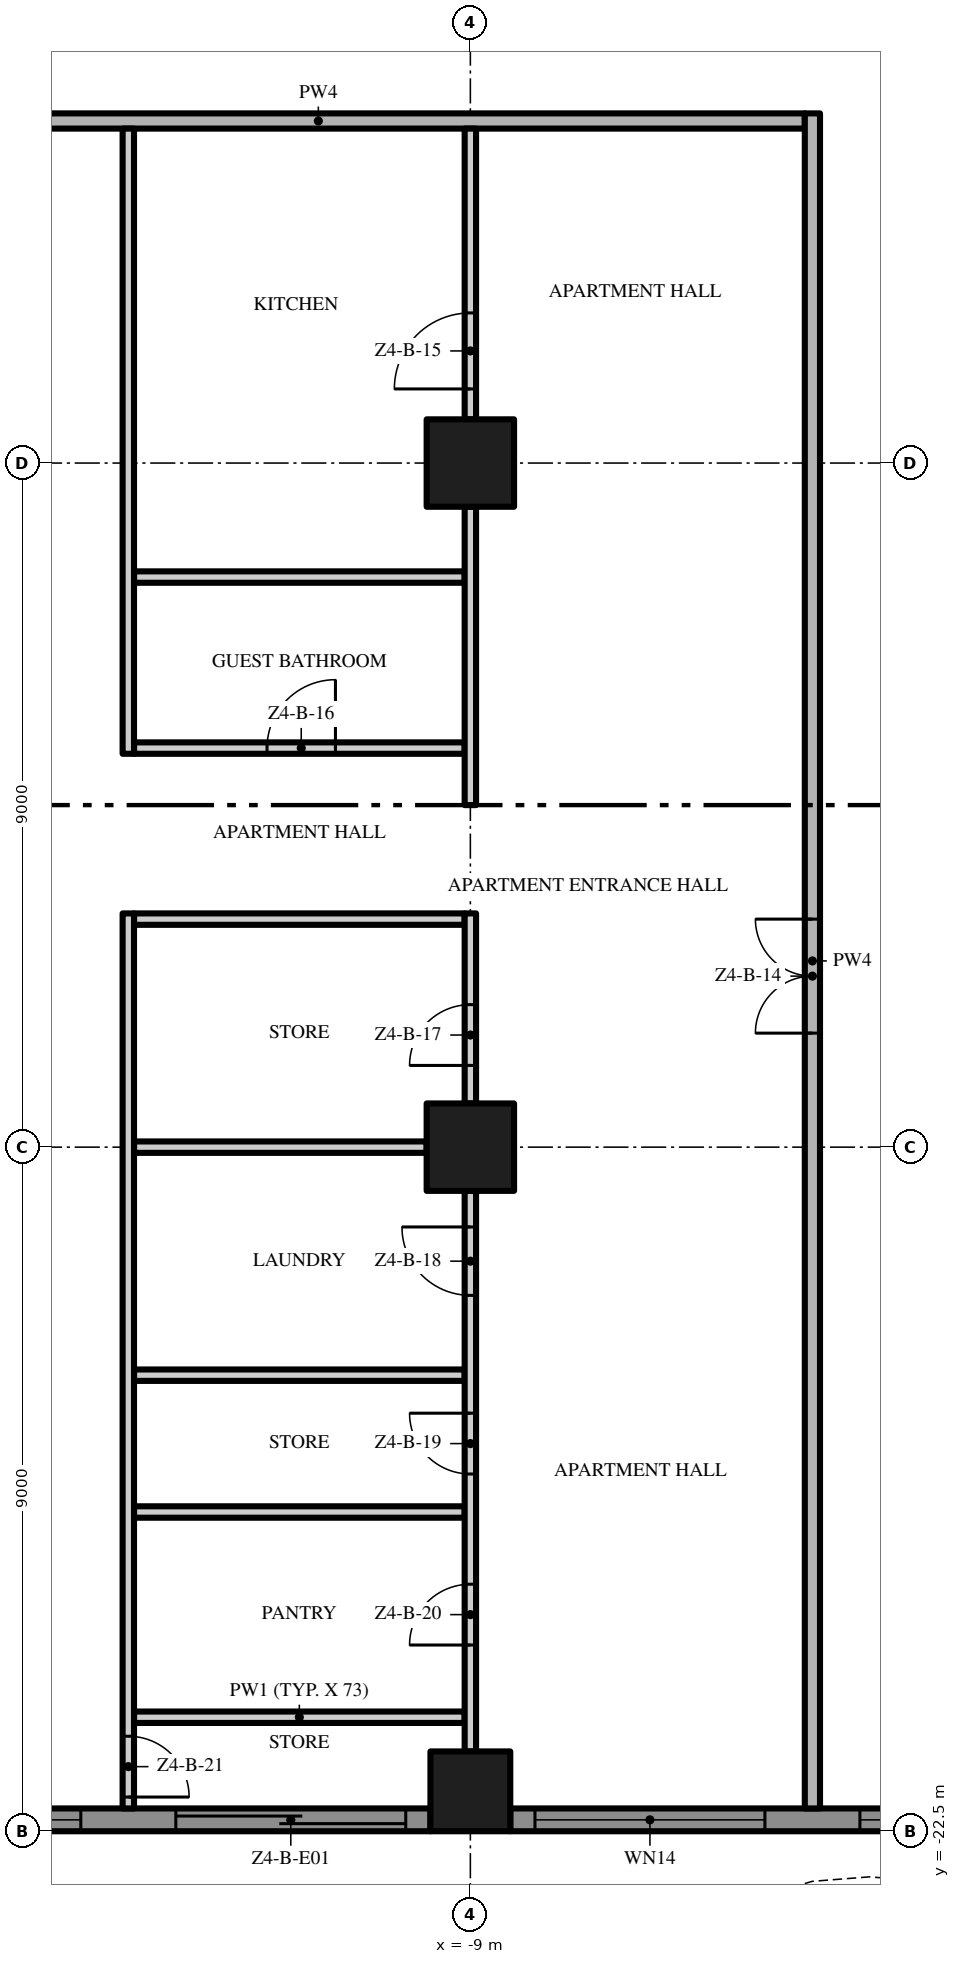
"""IFC4 building model, lengths in metres.
Left out: names, types, materials, properties, quantities, classifications, styles, units other than length and angle.
Written with IfcOpenShell. Run it as: python <this file> out.ifc"""

import sys

from ifc_helpers import new_model, si_unit, direction, frame, frame_2d, origin, origin_2d, place, context, subcontext, project, spatial, polyline, rectangle, outline, extrude, element, fill, save


model = new_model("IFC4")
c1 = context("Model", 3, precision=1e-05, world=origin(), true_north=direction((0.0, 1.0)))
c2 = subcontext(c1, "Body", "Model", "MODEL_VIEW")
j1 = project(units=[si_unit("LENGTHUNIT", "METRE"), si_unit("PLANEANGLEUNIT", "RADIAN")], contexts=[c1])
p1 = place(None, origin())
s1 = spatial("IfcSite", under=j1, at=p1, CompositionType="ELEMENT")
p2 = place(p1, origin())
s2 = spatial("IfcBuilding", under=s1, at=p2, CompositionType="ELEMENT")
p3 = place(p2, frame((0.0, 0.0, 195.8)))
s3 = spatial("IfcBuildingStorey", under=s2, at=p3, CompositionType="ELEMENT", Elevation=195.8)
p4 = place(p3, frame((-9.0, -13.5, 0.0), z_axis=(0.0, 0.0, 1.0), x_axis=(1.0, 0.0, 0.0)))
e1 = element("IfcColumn", 1, at=p4, inside=s3, PredefinedType="COLUMN", context=c2, shape_type="SweptSolid", body=[
    extrude(rectangle(XDim=1.15, YDim=1.15, at=origin_2d()), origin(), (0.0, 0.0, 1.0), 3.5),
])
p5 = place(p3, frame((-9.0, -21.975, 0.0), z_axis=(0.0, 0.0, 1.0), x_axis=(1.0, 0.0, 0.0)))
e2 = element("IfcColumn", 2, at=p5, inside=s3, PredefinedType="COLUMN", context=c2, shape_type="SweptSolid", body=[
    extrude(rectangle(XDim=1.05, YDim=1.05, at=origin_2d()), origin(), (0.0, 0.0, 1.0), 3.5),
])
p6 = place(p3, frame((-9.0, -4.5, 0.0), z_axis=(0.0, 0.0, 1.0), x_axis=(1.0, 0.0, 0.0)))
e3 = element("IfcColumn", 3, at=p6, inside=s3, PredefinedType="COLUMN", context=c2, shape_type="SweptSolid", body=[
    extrude(rectangle(XDim=1.15, YDim=1.15, at=origin_2d()), origin(), (0.0, 0.0, 1.0), 3.5),
])
p7 = place(p3, frame((-9.525, -22.35, 0.0), z_axis=(0.0, 0.0, 1.0), x_axis=(-1.0, 0.0, 0.0)))
e4 = element("IfcWall", 4, at=p7, inside=s3, PredefinedType="SOLIDWALL", context=c2, shape_type="SweptSolid", body=[
    extrude(rectangle(XDim=7.95, YDim=0.3, at=frame_2d((3.975, 0.0))), origin(), (0.0, 0.0, 1.0), 3.5),
])
p8 = place(p7, frame((4.6, 0.0, 0.45)))
e5 = element("IfcOpeningElement", 5, at=p8, cuts=e4, PredefinedType="OPENING", context=c2, shape_type="SweptSolid", body=[
    extrude(rectangle(XDim=3.025, YDim=2.65, at=frame_2d((1.512, 1.325))), frame((0.0, 0.16, 0.0), z_axis=(0.0, -1.0, 0.0), x_axis=(1.0, 0.0, 0.0)), (0.0, 0.0, 1.0), 0.32),
])
p9 = place(p7, frame((0.325, 0.0, 0.0)))
e6 = element("IfcOpeningElement", 6, at=p9, cuts=e4, PredefinedType="OPENING", context=c2, shape_type="SweptSolid", body=[
    extrude(rectangle(XDim=3.025, YDim=2.4, at=frame_2d((1.512, 1.2))), frame((0.0, 0.16, 0.0), z_axis=(0.0, -1.0, 0.0), x_axis=(1.0, 0.0, 0.0)), (0.0, 0.0, 1.0), 0.32),
])
p10 = place(p3, frame((-0.525, -22.35, 0.0), z_axis=(0.0, 0.0, 1.0), x_axis=(-1.0, 0.0, 0.0)))
e7 = element("IfcWall", 7, at=p10, inside=s3, PredefinedType="SOLIDWALL", context=c2, shape_type="SweptSolid", body=[
    extrude(rectangle(XDim=7.95, YDim=0.3, at=frame_2d((3.975, 0.0))), origin(), (0.0, 0.0, 1.0), 3.5),
])
p11 = place(p10, frame((4.6, 0.0, 0.45)))
e8 = element("IfcOpeningElement", 8, at=p11, cuts=e7, PredefinedType="OPENING", context=c2, shape_type="SweptSolid", body=[
    extrude(rectangle(XDim=3.025, YDim=2.65, at=frame_2d((1.512, 1.325))), frame((0.0, 0.16, 0.0), z_axis=(0.0, -1.0, 0.0), x_axis=(1.0, 0.0, 0.0)), (0.0, 0.0, 1.0), 0.32),
])
p12 = place(p10, frame((0.325, 0.0, 0.45)))
e9 = element("IfcOpeningElement", 9, at=p12, cuts=e7, PredefinedType="OPENING", context=c2, shape_type="SweptSolid", body=[
    extrude(rectangle(XDim=3.025, YDim=2.65, at=frame_2d((1.512, 1.325))), frame((0.0, 0.16, 0.0), z_axis=(0.0, -1.0, 0.0), x_axis=(1.0, 0.0, 0.0)), (0.0, 0.0, 1.0), 0.32),
])
p13 = place(p3, origin())
e10 = element("IfcWall", 10, at=p13, inside=s3, PredefinedType="USERDEFINED", context=c2, shape_type="SweptSolid", body=[
    extrude(outline(polyline([(-22.5, -24.3), (-21.0, -23.595), (-19.5, -23.159), (-18.75, -23.1), (-18.0, -23.159), (-16.5, -23.595), (-15.0, -24.3), (-13.5, -25.005), (-12.0, -25.441), (-11.25, -25.5), (-10.5, -25.441), (-9.0, -25.005), (-7.5, -24.3), (-6.0, -23.595), (-4.5, -23.159), (-3.75, -23.1), (-3.0, -23.159), (-1.5, -23.595), (0.0, -24.3), (1.5, -25.005), (3.0, -25.441), (3.75, -25.5), (4.5, -25.441), (6.0, -25.005), (7.5, -24.3), (9.0, -23.595), (10.5, -23.159), (11.25, -23.1), (12.0, -23.159), (13.5, -23.595), (15.0, -24.3), (16.5, -25.005), (18.0, -25.441), (18.75, -25.5), (19.5, -25.441), (21.0, -25.005), (22.5, -24.3), (22.394, -24.074), (20.911, -24.771), (19.455, -25.194), (18.75, -25.249), (18.045, -25.194), (16.589, -24.771), (15.106, -24.074), (13.589, -23.36), (12.045, -22.911), (11.25, -22.849), (10.455, -22.911), (8.911, -23.36), (7.394, -24.074), (5.911, -24.771), (4.455, -25.194), (3.75, -25.249), (3.045, -25.194), (1.589, -24.771), (0.106, -24.074), (-1.411, -23.36), (-2.955, -22.911), (-3.75, -22.849), (-4.545, -22.911), (-6.089, -23.36), (-7.606, -24.074), (-9.089, -24.771), (-10.545, -25.194), (-11.25, -25.249), (-11.955, -25.194), (-13.411, -24.771), (-14.894, -24.074), (-16.411, -23.36), (-17.955, -22.911), (-18.75, -22.849), (-19.545, -22.911), (-21.089, -23.36), (-22.606, -24.074), (-22.5, -24.3)])), origin(), (0.0, 0.0, 1.0), 0.9),
])
for number, where, z_axis, x_axis in (
    (11, (-13.425, -21.0, 0.0), (0.0, 0.0, 1.0), (1.0, 0.0, 0.0)),
    (12, (-13.425, -18.3, 0.0), (0.0, 0.0, 1.0), (1.0, 0.0, 0.0)),
    (13, (-13.425, -16.5, 0.0), (0.0, 0.0, 1.0), (1.0, 0.0, 0.0)),
):
    element("IfcWall", number, at=place(p3, frame(where, z_axis=z_axis, x_axis=x_axis)), inside=s3, PredefinedType="PARTITIONING", context=c2, shape_type="SweptSolid", body=[
        extrude(rectangle(XDim=4.35, YDim=0.15, at=frame_2d((2.175, 0.0))), origin(), (0.0, 0.0, 1.0), 3.5),
    ])
p14 = place(p3, frame((-13.425, -13.5, 0.0), z_axis=(0.0, 0.0, 1.0), x_axis=(1.0, 0.0, 0.0)))
e14 = element("IfcWall", 14, at=p14, inside=s3, PredefinedType="PARTITIONING", context=c2, shape_type="SweptSolid", body=[
    extrude(rectangle(XDim=3.85, YDim=0.15, at=frame_2d((1.925, 0.0))), origin(), (0.0, 0.0, 1.0), 3.5),
])
p15 = place(p3, frame((-13.425, -10.5, 0.0), z_axis=(0.0, 0.0, 1.0), x_axis=(1.0, 0.0, 0.0)))
e15 = element("IfcWall", 15, at=p15, inside=s3, PredefinedType="PARTITIONING", context=c2, shape_type="SweptSolid", body=[
    extrude(rectangle(XDim=4.35, YDim=0.15, at=frame_2d((2.175, 0.0))), origin(), (0.0, 0.0, 1.0), 3.5),
])
p16 = place(p3, frame((-13.425, -8.25, 0.0), z_axis=(0.0, 0.0, 1.0), x_axis=(1.0, 0.0, 0.0)))
e16 = element("IfcWall", 16, at=p16, inside=s3, PredefinedType="PARTITIONING", context=c2, shape_type="SweptSolid", body=[
    extrude(rectangle(XDim=4.35, YDim=0.15, at=frame_2d((2.175, 0.0))), origin(), (0.0, 0.0, 1.0), 3.5),
])
p17 = place(p16, frame((1.75, 0.0, 0.0)))
e17 = element("IfcOpeningElement", 17, at=p17, cuts=e16, PredefinedType="OPENING", context=c2, shape_type="SweptSolid", body=[
    extrude(rectangle(XDim=0.9, YDim=2.1, at=frame_2d((0.45, 1.05))), frame((0.0, 0.085, 0.0), z_axis=(0.0, -1.0, 0.0), x_axis=(1.0, 0.0, 0.0)), (0.0, 0.0, 1.0), 0.17),
])
p18 = place(p3, frame((-13.425, -6.0, 0.0), z_axis=(0.0, 0.0, 1.0), x_axis=(1.0, 0.0, 0.0)))
e18 = element("IfcWall", 18, at=p18, inside=s3, PredefinedType="PARTITIONING", context=c2, shape_type="SweptSolid", body=[
    extrude(rectangle(XDim=4.35, YDim=0.15, at=frame_2d((2.175, 0.0))), origin(), (0.0, 0.0, 1.0), 3.5),
])
p19 = place(p3, frame((-17.4, 0.0, 0.0), z_axis=(0.0, 0.0, 1.0), x_axis=(1.0, 0.0, 0.0)))
e19 = element("IfcWall", 19, at=p19, inside=s3, PredefinedType="PARTITIONING", context=c2, shape_type="SweptSolid", body=[
    extrude(rectangle(XDim=12.8, YDim=0.2, at=frame_2d((6.4, 0.0))), origin(), (0.0, 0.0, 1.0), 3.5),
])
p20 = place(p3, frame((-13.5, -10.425, 0.0), z_axis=(0.0, 0.0, 1.0), x_axis=(0.0, -1.0, 0.0)))
e20 = element("IfcWall", 20, at=p20, inside=s3, PredefinedType="PARTITIONING", context=c2, shape_type="SweptSolid", body=[
    extrude(rectangle(XDim=11.775, YDim=0.15, at=frame_2d((5.888, 0.0))), origin(), (0.0, 0.0, 1.0), 3.5),
])
p21 = place(p20, frame((10.825, 0.0, 0.0)))
e21 = element("IfcOpeningElement", 21, at=p21, cuts=e20, PredefinedType="OPENING", context=c2, shape_type="SweptSolid", body=[
    extrude(rectangle(XDim=0.8, YDim=2.0, at=frame_2d((0.4, 1.0))), frame((0.0, 0.085, 0.0), z_axis=(0.0, -1.0, 0.0), x_axis=(1.0, 0.0, 0.0)), (0.0, 0.0, 1.0), 0.17),
])
p22 = place(p3, frame((-13.5, -8.325, 0.0), z_axis=(0.0, 0.0, 1.0), x_axis=(0.0, 1.0, 0.0)))
e22 = element("IfcWall", 22, at=p22, inside=s3, PredefinedType="PARTITIONING", context=c2, shape_type="SweptSolid", body=[
    extrude(rectangle(XDim=8.225, YDim=0.15, at=frame_2d((4.112, 0.0))), origin(), (0.0, 0.0, 1.0), 3.5),
])
p23 = place(p3, frame((-9.0, -21.45, 0.0), z_axis=(0.0, 0.0, 1.0), x_axis=(0.0, 1.0, 0.0)))
e23 = element("IfcWall", 23, at=p23, inside=s3, PredefinedType="PARTITIONING", context=c2, shape_type="SweptSolid", body=[
    extrude(rectangle(XDim=7.375, YDim=0.15, at=frame_2d((3.688, 0.0))), origin(), (0.0, 0.0, 1.0), 3.5),
])
p24 = place(p23, frame((6.0, 0.0, 0.0)))
e24 = element("IfcOpeningElement", 24, at=p24, cuts=e23, PredefinedType="OPENING", context=c2, shape_type="SweptSolid", body=[
    extrude(rectangle(XDim=0.9, YDim=2.1, at=frame_2d((0.45, 1.05))), frame((0.0, 0.085, 0.0), z_axis=(0.0, -1.0, 0.0), x_axis=(1.0, 0.0, 0.0)), (0.0, 0.0, 1.0), 0.17),
])
p25 = place(p23, frame((3.65, 0.0, 0.0)))
e25 = element("IfcOpeningElement", 25, at=p25, cuts=e23, PredefinedType="OPENING", context=c2, shape_type="SweptSolid", body=[
    extrude(rectangle(XDim=0.8, YDim=2.0, at=frame_2d((0.4, 1.0))), frame((0.0, 0.085, 0.0), z_axis=(0.0, -1.0, 0.0), x_axis=(1.0, 0.0, 0.0)), (0.0, 0.0, 1.0), 0.17),
])
p26 = place(p23, frame((1.4, 0.0, 0.0)))
e26 = element("IfcOpeningElement", 26, at=p26, cuts=e23, PredefinedType="OPENING", context=c2, shape_type="SweptSolid", body=[
    extrude(rectangle(XDim=0.8, YDim=2.0, at=frame_2d((0.4, 1.0))), frame((0.0, 0.085, 0.0), z_axis=(0.0, -1.0, 0.0), x_axis=(1.0, 0.0, 0.0)), (0.0, 0.0, 1.0), 0.17),
])
p27 = place(p3, frame((-9.0, -12.925, 0.0), z_axis=(0.0, 0.0, 1.0), x_axis=(0.0, 1.0, 0.0)))
e27 = element("IfcWall", 27, at=p27, inside=s3, PredefinedType="PARTITIONING", context=c2, shape_type="SweptSolid", body=[
    extrude(rectangle(XDim=2.5, YDim=0.15, at=frame_2d((1.25, 0.0))), origin(), (0.0, 0.0, 1.0), 3.5),
])
p28 = place(p27, frame((0.5, 0.0, 0.0)))
e28 = element("IfcOpeningElement", 28, at=p28, cuts=e27, PredefinedType="OPENING", context=c2, shape_type="SweptSolid", body=[
    extrude(rectangle(XDim=0.8, YDim=2.0, at=frame_2d((0.4, 1.0))), frame((0.0, 0.085, 0.0), z_axis=(0.0, -1.0, 0.0), x_axis=(1.0, 0.0, 0.0)), (0.0, 0.0, 1.0), 0.17),
])
p29 = place(p3, frame((-9.0, -9.0, 0.0), z_axis=(0.0, 0.0, 1.0), x_axis=(0.0, 1.0, 0.0)))
e29 = element("IfcWall", 29, at=p29, inside=s3, PredefinedType="PARTITIONING", context=c2, shape_type="SweptSolid", body=[
    extrude(rectangle(XDim=3.925, YDim=0.15, at=frame_2d((1.962, 0.0))), origin(), (0.0, 0.0, 1.0), 3.5),
])
p30 = place(p3, frame((-9.0, -3.925, 0.0), z_axis=(0.0, 0.0, 1.0), x_axis=(0.0, 1.0, 0.0)))
e30 = element("IfcWall", 30, at=p30, inside=s3, PredefinedType="PARTITIONING", context=c2, shape_type="SweptSolid", body=[
    extrude(rectangle(XDim=3.825, YDim=0.15, at=frame_2d((1.913, 0.0))), origin(), (0.0, 0.0, 1.0), 3.5),
])
p31 = place(p30, frame((0.4, 0.0, 0.0)))
e31 = element("IfcOpeningElement", 31, at=p31, cuts=e30, PredefinedType="OPENING", context=c2, shape_type="SweptSolid", body=[
    extrude(rectangle(XDim=1.0, YDim=2.4, at=frame_2d((0.5, 1.2))), frame((0.0, 0.085, 0.0), z_axis=(0.0, -1.0, 0.0), x_axis=(1.0, 0.0, 0.0)), (0.0, 0.0, 1.0), 0.17),
])
p32 = place(p3, frame((-4.5, -22.2, 0.0), z_axis=(0.0, 0.0, 1.0), x_axis=(0.0, 1.0, 0.0)))
e32 = element("IfcWall", 32, at=p32, inside=s3, PredefinedType="PARTITIONING", context=c2, shape_type="SweptSolid", body=[
    extrude(rectangle(XDim=22.3, YDim=0.2, at=frame_2d((11.15, 0.0))), origin(), (0.0, 0.0, 1.0), 3.5),
])
p33 = place(p32, frame((10.2, 0.0, 0.0)))
e33 = element("IfcOpeningElement", 33, at=p33, cuts=e32, PredefinedType="OPENING", context=c2, shape_type="SweptSolid", body=[
    extrude(rectangle(XDim=1.5, YDim=2.4, at=frame_2d((0.75, 1.2))), frame((0.0, 0.11, 0.0), z_axis=(0.0, -1.0, 0.0), x_axis=(1.0, 0.0, 0.0)), (0.0, 0.0, 1.0), 0.22),
])
p34 = place(p8, origin())
e34 = element("IfcWindow", 34, at=p34, inside=s3, PartitioningType="SINGLE_PANEL", PredefinedType="WINDOW", context=c2, shape_type="SweptSolid", body=[
    extrude(rectangle(XDim=3.025, YDim=2.65, at=frame_2d((1.512, 1.325))), frame((0.0, 0.03, 0.0), z_axis=(0.0, -1.0, 0.0), x_axis=(1.0, 0.0, 0.0)), (0.0, 0.0, 1.0), 0.06),
])
fill(e5, e34)
p35 = place(p9, origin())
e35 = element("IfcDoor", 35, at=p35, inside=s3, OperationType="SINGLE_SWING_LEFT", PredefinedType="DOOR", context=c2, shape_type="SweptSolid", body=[
    extrude(rectangle(XDim=3.025, YDim=2.4, at=frame_2d((1.512, 1.2))), frame((0.0, 0.025, 0.0), z_axis=(0.0, -1.0, 0.0), x_axis=(1.0, 0.0, 0.0)), (0.0, 0.0, 1.0), 0.05),
])
fill(e6, e35)
p36 = place(p11, origin())
e36 = element("IfcWindow", 36, at=p36, inside=s3, PartitioningType="SINGLE_PANEL", PredefinedType="WINDOW", context=c2, shape_type="SweptSolid", body=[
    extrude(rectangle(XDim=3.025, YDim=2.65, at=frame_2d((1.512, 1.325))), frame((0.0, 0.03, 0.0), z_axis=(0.0, -1.0, 0.0), x_axis=(1.0, 0.0, 0.0)), (0.0, 0.0, 1.0), 0.06),
])
fill(e8, e36)
p37 = place(p12, origin())
e37 = element("IfcWindow", 37, at=p37, inside=s3, PartitioningType="SINGLE_PANEL", PredefinedType="WINDOW", context=c2, shape_type="SweptSolid", body=[
    extrude(rectangle(XDim=3.025, YDim=2.65, at=frame_2d((1.512, 1.325))), frame((0.0, 0.03, 0.0), z_axis=(0.0, -1.0, 0.0), x_axis=(1.0, 0.0, 0.0)), (0.0, 0.0, 1.0), 0.06),
])
fill(e9, e37)
p38 = place(p33, origin())
e38 = element("IfcDoor", 38, at=p38, inside=s3, OperationType="DOUBLE_DOOR_SINGLE_SWING", PredefinedType="DOOR", context=c2, shape_type="SweptSolid", body=[
    extrude(rectangle(XDim=1.5, YDim=2.4, at=frame_2d((0.75, 1.2))), frame((0.0, 0.025, 0.0), z_axis=(0.0, -1.0, 0.0), x_axis=(1.0, 0.0, 0.0)), (0.0, 0.0, 1.0), 0.05),
])
fill(e33, e38)
p39 = place(p31, origin())
e39 = element("IfcDoor", 39, at=p39, inside=s3, OperationType="SINGLE_SWING_LEFT", PredefinedType="DOOR", context=c2, shape_type="SweptSolid", body=[
    extrude(rectangle(XDim=1.0, YDim=2.4, at=frame_2d((0.5, 1.2))), frame((0.0, 0.025, 0.0), z_axis=(0.0, -1.0, 0.0), x_axis=(1.0, 0.0, 0.0)), (0.0, 0.0, 1.0), 0.05),
])
fill(e31, e39)
p40 = place(p17, origin())
e40 = element("IfcDoor", 40, at=p40, inside=s3, OperationType="SINGLE_SWING_RIGHT", PredefinedType="DOOR", context=c2, shape_type="SweptSolid", body=[
    extrude(rectangle(XDim=0.9, YDim=2.1, at=frame_2d((0.45, 1.05))), frame((0.0, 0.025, 0.0), z_axis=(0.0, -1.0, 0.0), x_axis=(1.0, 0.0, 0.0)), (0.0, 0.0, 1.0), 0.05),
])
fill(e17, e40)
p41 = place(p28, origin())
e41 = element("IfcDoor", 41, at=p41, inside=s3, OperationType="SINGLE_SWING_LEFT", PredefinedType="DOOR", context=c2, shape_type="SweptSolid", body=[
    extrude(rectangle(XDim=0.8, YDim=2.0, at=frame_2d((0.4, 1.0))), frame((0.0, 0.025, 0.0), z_axis=(0.0, -1.0, 0.0), x_axis=(1.0, 0.0, 0.0)), (0.0, 0.0, 1.0), 0.05),
])
fill(e28, e41)
p42 = place(p24, origin())
e42 = element("IfcDoor", 42, at=p42, inside=s3, OperationType="SINGLE_SWING_RIGHT", PredefinedType="DOOR", context=c2, shape_type="SweptSolid", body=[
    extrude(rectangle(XDim=0.9, YDim=2.1, at=frame_2d((0.45, 1.05))), frame((0.0, 0.025, 0.0), z_axis=(0.0, -1.0, 0.0), x_axis=(1.0, 0.0, 0.0)), (0.0, 0.0, 1.0), 0.05),
])
fill(e24, e42)
p43 = place(p25, origin())
e43 = element("IfcDoor", 43, at=p43, inside=s3, OperationType="SINGLE_SWING_RIGHT", PredefinedType="DOOR", context=c2, shape_type="SweptSolid", body=[
    extrude(rectangle(XDim=0.8, YDim=2.0, at=frame_2d((0.4, 1.0))), frame((0.0, 0.025, 0.0), z_axis=(0.0, -1.0, 0.0), x_axis=(1.0, 0.0, 0.0)), (0.0, 0.0, 1.0), 0.05),
])
fill(e25, e43)
p44 = place(p26, origin())
e44 = element("IfcDoor", 44, at=p44, inside=s3, OperationType="SINGLE_SWING_LEFT", PredefinedType="DOOR", context=c2, shape_type="SweptSolid", body=[
    extrude(rectangle(XDim=0.8, YDim=2.0, at=frame_2d((0.4, 1.0))), frame((0.0, 0.025, 0.0), z_axis=(0.0, -1.0, 0.0), x_axis=(1.0, 0.0, 0.0)), (0.0, 0.0, 1.0), 0.05),
])
fill(e26, e44)
p45 = place(p21, origin())
e45 = element("IfcDoor", 45, at=p45, inside=s3, OperationType="SINGLE_SWING_RIGHT", PredefinedType="DOOR", context=c2, shape_type="SweptSolid", body=[
    extrude(rectangle(XDim=0.8, YDim=2.0, at=frame_2d((0.4, 1.0))), frame((0.0, 0.025, 0.0), z_axis=(0.0, -1.0, 0.0), x_axis=(1.0, 0.0, 0.0)), (0.0, 0.0, 1.0), 0.05),
])
fill(e21, e45)
save(model, sys.argv[1])
